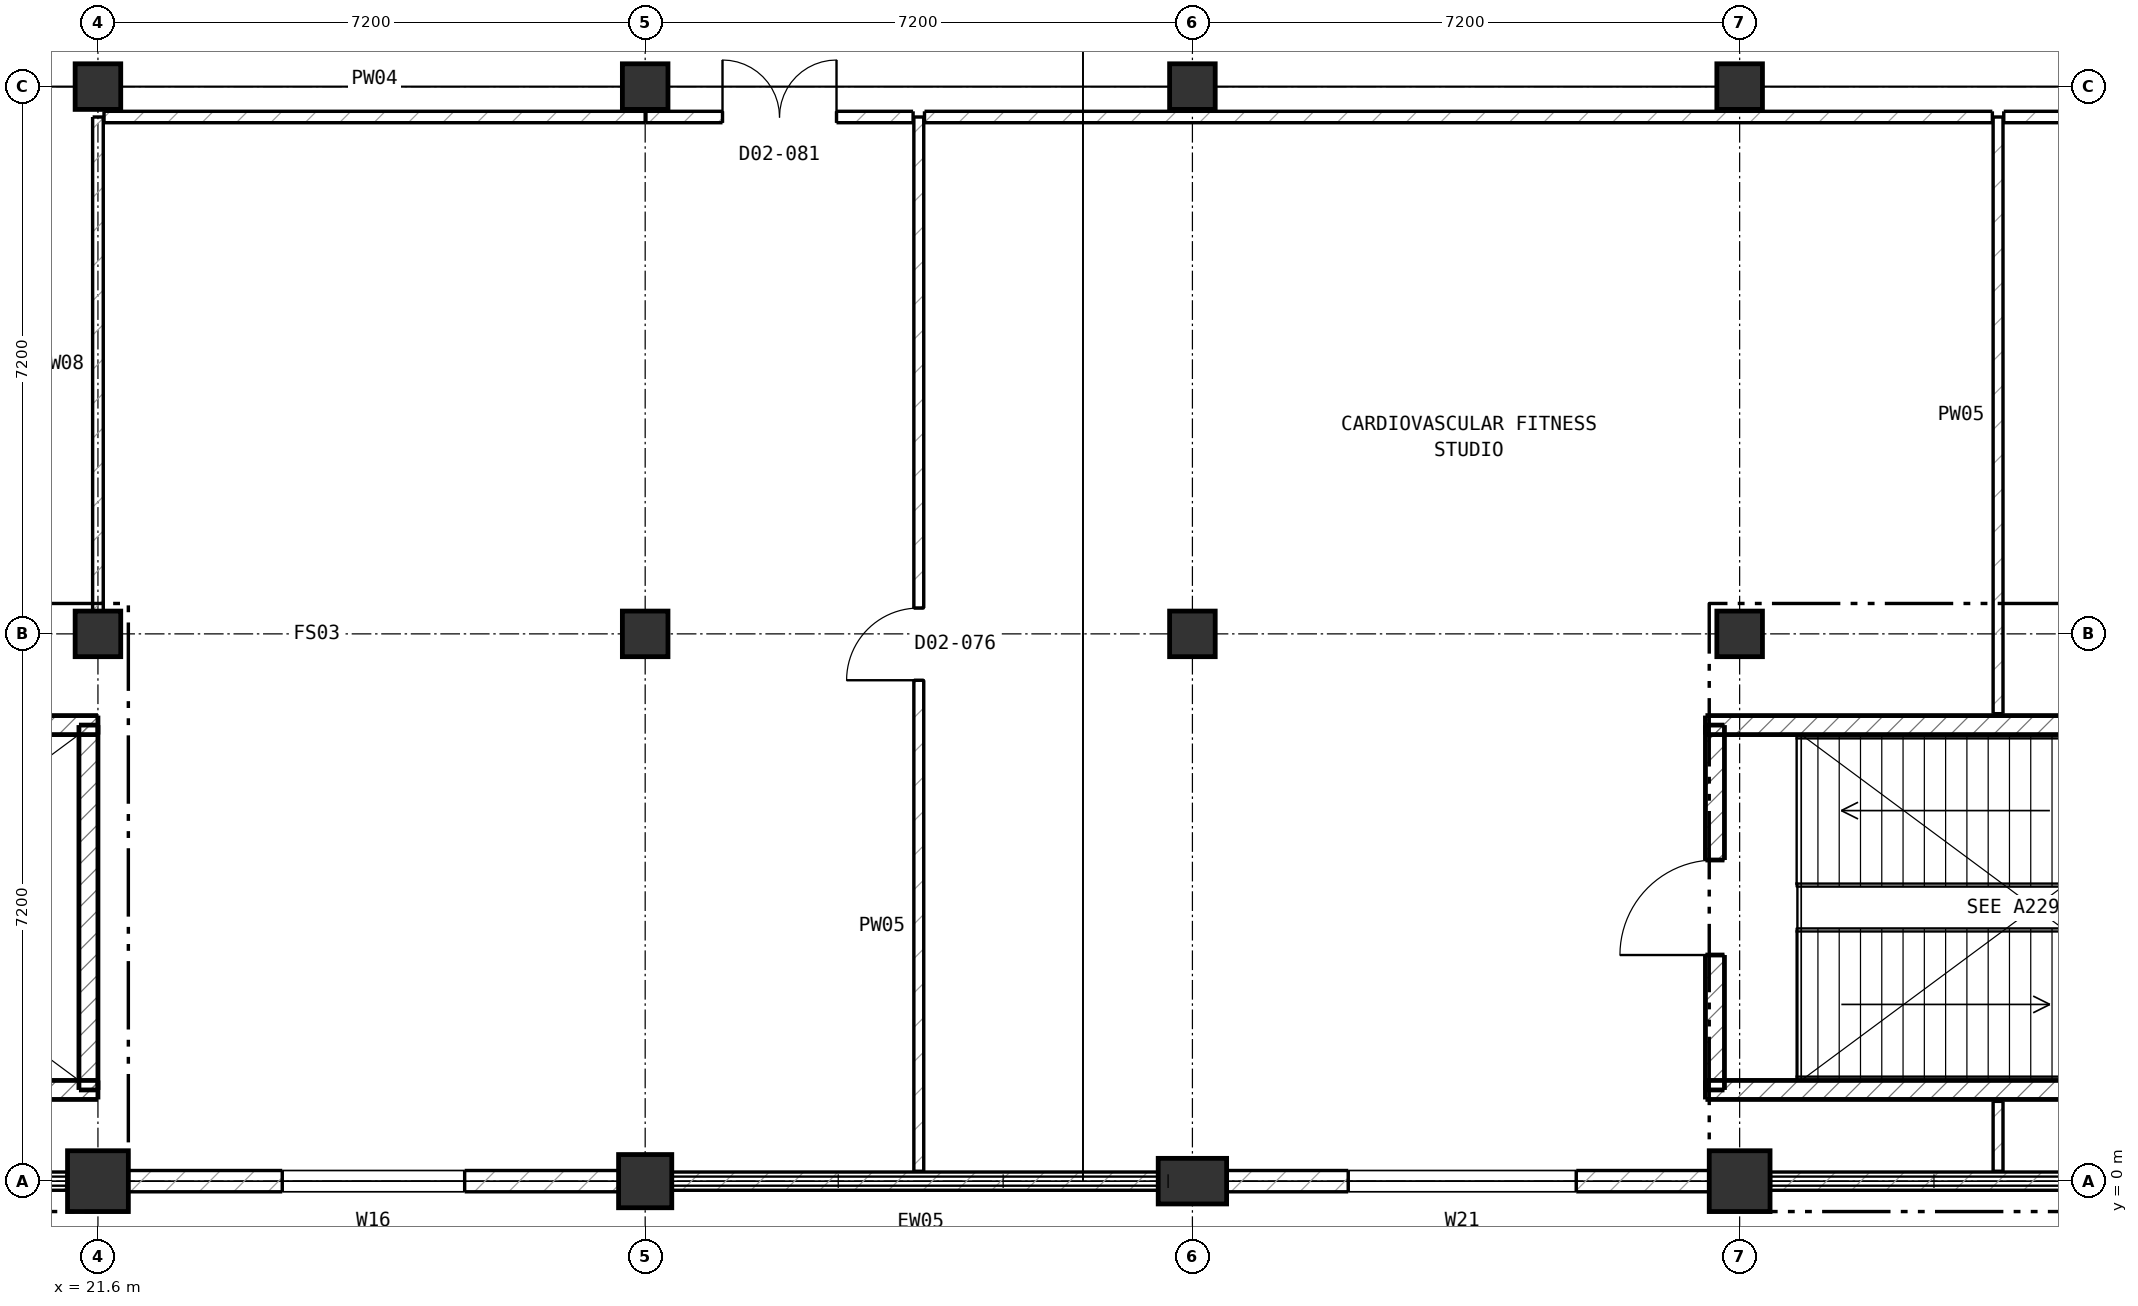
"""IFC4 building model, lengths in metres.
Left out: names, types, materials, properties, quantities, classifications, styles, units other than length and angle.
Written with IfcOpenShell. Run it as: python <this file> out.ifc"""

import sys

from ifc_helpers import new_model, si_unit, direction, frame, frame_2d, origin, origin_2d, place, context, subcontext, project, spatial, rectangle, extrude, element, fill, save


model = new_model("IFC4")
c1 = context("Model", 3, precision=1e-05, world=origin(), true_north=direction((0.0, 1.0)))
c2 = subcontext(c1, "Body", "Model", "MODEL_VIEW")
j1 = project(units=[si_unit("LENGTHUNIT", "METRE"), si_unit("PLANEANGLEUNIT", "RADIAN")], contexts=[c1])
p1 = place(None, origin())
s1 = spatial("IfcSite", under=j1, at=p1, CompositionType="ELEMENT")
p2 = place(p1, origin())
s2 = spatial("IfcBuilding", under=s1, at=p2, CompositionType="ELEMENT")
p3 = place(p2, frame((0.0, 0.0, 11.2)))
s3 = spatial("IfcBuildingStorey", under=s2, at=p3, CompositionType="ELEMENT", Elevation=11.2)
p4 = place(p3, frame((21.6, 0.0, 0.0), z_axis=(0.0, 0.0, 1.0), x_axis=(1.0, 0.0, 0.0)))
e1 = element("IfcColumn", 1, at=p4, inside=s3, PredefinedType="COLUMN", context=c2, shape_type="SweptSolid", body=[
    extrude(rectangle(XDim=0.8, YDim=0.8, at=origin_2d()), origin(), (0.0, 0.0, 1.0), 4.8),
])
for number, where, z_axis, x_axis in (
    (2, (21.6, 7.2, 0.0), (0.0, 0.0, 1.0), (1.0, 0.0, 0.0)),
    (3, (21.6, 14.4, 0.0), (0.0, 0.0, 1.0), (1.0, 0.0, 0.0)),
):
    element("IfcColumn", number, at=place(p3, frame(where, z_axis=z_axis, x_axis=x_axis)), inside=s3, PredefinedType="COLUMN", context=c2, shape_type="SweptSolid", body=[
        extrude(rectangle(XDim=0.6, YDim=0.6, at=origin_2d()), origin(), (0.0, 0.0, 1.0), 4.8),
    ])
p5 = place(p3, frame((28.8, 0.0, 0.0), z_axis=(0.0, 0.0, 1.0), x_axis=(1.0, 0.0, 0.0)))
e4 = element("IfcColumn", 4, at=p5, inside=s3, PredefinedType="COLUMN", context=c2, shape_type="SweptSolid", body=[
    extrude(rectangle(XDim=0.7, YDim=0.7, at=origin_2d()), origin(), (0.0, 0.0, 1.0), 4.8),
])
for number, where, z_axis, x_axis in (
    (5, (28.8, 7.2, 0.0), (0.0, 0.0, 1.0), (1.0, 0.0, 0.0)),
    (6, (28.8, 14.4, 0.0), (0.0, 0.0, 1.0), (1.0, 0.0, 0.0)),
):
    element("IfcColumn", number, at=place(p3, frame(where, z_axis=z_axis, x_axis=x_axis)), inside=s3, PredefinedType="COLUMN", context=c2, shape_type="SweptSolid", body=[
        extrude(rectangle(XDim=0.6, YDim=0.6, at=origin_2d()), origin(), (0.0, 0.0, 1.0), 4.8),
    ])
p6 = place(p3, frame((36.0, 0.0, 0.0), z_axis=(0.0, 0.0, 1.0), x_axis=(1.0, 0.0, 0.0)))
e7 = element("IfcColumn", 7, at=p6, inside=s3, PredefinedType="COLUMN", context=c2, shape_type="SweptSolid", body=[
    extrude(rectangle(XDim=0.6, YDim=0.9, at=origin_2d()), origin(), (0.0, 0.0, 1.0), 4.8),
])
for number, where, z_axis, x_axis in (
    (8, (36.0, 7.2, 0.0), (0.0, 0.0, 1.0), (1.0, 0.0, 0.0)),
    (9, (36.0, 14.4, 0.0), (0.0, 0.0, 1.0), (1.0, 0.0, 0.0)),
):
    element("IfcColumn", number, at=place(p3, frame(where, z_axis=z_axis, x_axis=x_axis)), inside=s3, PredefinedType="COLUMN", context=c2, shape_type="SweptSolid", body=[
        extrude(rectangle(XDim=0.6, YDim=0.6, at=origin_2d()), origin(), (0.0, 0.0, 1.0), 4.8),
    ])
p7 = place(p3, frame((43.2, 0.0, 0.0), z_axis=(0.0, 0.0, 1.0), x_axis=(1.0, 0.0, 0.0)))
e10 = element("IfcColumn", 10, at=p7, inside=s3, PredefinedType="COLUMN", context=c2, shape_type="SweptSolid", body=[
    extrude(rectangle(XDim=0.8, YDim=0.8, at=origin_2d()), origin(), (0.0, 0.0, 1.0), 4.8),
])
for number, where, z_axis, x_axis in (
    (11, (43.2, 7.2, 0.0), (0.0, 0.0, 1.0), (1.0, 0.0, 0.0)),
    (12, (43.2, 14.4, 0.0), (0.0, 0.0, 1.0), (1.0, 0.0, 0.0)),
):
    element("IfcColumn", number, at=place(p3, frame(where, z_axis=z_axis, x_axis=x_axis)), inside=s3, PredefinedType="COLUMN", context=c2, shape_type="SweptSolid", body=[
        extrude(rectangle(XDim=0.6, YDim=0.6, at=origin_2d()), origin(), (0.0, 0.0, 1.0), 4.8),
    ])
p8 = place(p3, frame((50.065, 0.0, 0.0), z_axis=(0.0, 0.0, 1.0), x_axis=(-1.0, 0.0, 0.0)))
e13 = element("IfcWall", 13, at=p8, inside=s3, PredefinedType="SOLIDWALL", context=c2, shape_type="SweptSolid", body=[
    extrude(rectangle(XDim=6.48, YDim=0.24, at=frame_2d((3.24, 0.0))), origin(), (0.0, 0.0, 1.0), 0.35),
])
p9 = place(p3, frame((42.815, 0.0, 0.0), z_axis=(0.0, 0.0, 1.0), x_axis=(-1.0, 0.0, 0.0)))
e14 = element("IfcWall", 14, at=p9, inside=s3, PredefinedType="SOLIDWALL", context=c2, shape_type="SweptSolid", body=[
    extrude(rectangle(XDim=6.53, YDim=0.28, at=frame_2d((3.265, 0.0))), origin(), (0.0, 0.0, 1.0), 4.185),
])
p10 = place(p9, frame((1.765, 0.0, 0.9)))
e15 = element("IfcOpeningElement", 15, at=p10, cuts=e14, PredefinedType="OPENING", context=c2, shape_type="SweptSolid", body=[
    extrude(rectangle(XDim=3.0, YDim=2.1, at=frame_2d((1.5, 1.05))), frame((0.0, 0.15, 0.0), z_axis=(0.0, -1.0, 0.0), x_axis=(1.0, 0.0, 0.0)), (0.0, 0.0, 1.0), 0.3),
])
p11 = place(p3, frame((35.715, 0.0, 0.0), z_axis=(0.0, 0.0, 1.0), x_axis=(-1.0, 0.0, 0.0)))
e16 = element("IfcWall", 16, at=p11, inside=s3, PredefinedType="SOLIDWALL", context=c2, shape_type="SweptSolid", body=[
    extrude(rectangle(XDim=6.58, YDim=0.24, at=frame_2d((3.29, 0.0))), origin(), (0.0, 0.0, 1.0), 0.35),
])
p12 = place(p3, frame((28.465, 0.0, 0.0), z_axis=(0.0, 0.0, 1.0), x_axis=(-1.0, 0.0, 0.0)))
e17 = element("IfcWall", 17, at=p12, inside=s3, PredefinedType="SOLIDWALL", context=c2, shape_type="SweptSolid", body=[
    extrude(rectangle(XDim=6.48, YDim=0.28, at=frame_2d((3.24, 0.0))), origin(), (0.0, 0.0, 1.0), 4.185),
])
p13 = place(p12, frame((2.04, 0.0, 0.9)))
e18 = element("IfcOpeningElement", 18, at=p13, cuts=e17, PredefinedType="OPENING", context=c2, shape_type="SweptSolid", body=[
    extrude(rectangle(XDim=2.4, YDim=2.1, at=frame_2d((1.2, 1.05))), frame((0.0, 0.15, 0.0), z_axis=(0.0, -1.0, 0.0), x_axis=(1.0, 0.0, 0.0)), (0.0, 0.0, 1.0), 0.3),
])
p14 = place(p3, frame((21.215, 0.0, 0.0), z_axis=(0.0, 0.0, 1.0), x_axis=(-1.0, 0.0, 0.0)))
e19 = element("IfcWall", 19, at=p14, inside=s3, PredefinedType="SOLIDWALL", context=c2, shape_type="SweptSolid", body=[
    extrude(rectangle(XDim=6.53, YDim=0.24, at=frame_2d((3.265, 0.0))), origin(), (0.0, 0.0, 1.0), 0.35),
])
p15 = place(p3, frame((13.95, 6.0, 0.0), z_axis=(0.0, 0.0, 1.0), x_axis=(1.0, 0.0, 0.0)))
e20 = element("IfcWall", 20, at=p15, inside=s3, PredefinedType="SHEAR", context=c2, shape_type="SweptSolid", body=[
    extrude(rectangle(XDim=7.65, YDim=0.25, at=frame_2d((3.825, 0.0))), origin(), (0.0, 0.0, 1.0), 4.8),
])
p16 = place(p3, frame((21.475, 6.0, 0.0), z_axis=(0.0, 0.0, 1.0), x_axis=(0.0, -1.0, 0.0)))
e21 = element("IfcWall", 21, at=p16, inside=s3, PredefinedType="SHEAR", context=c2, shape_type="SweptSolid", body=[
    extrude(rectangle(XDim=4.8, YDim=0.25, at=frame_2d((2.4, 0.0))), origin(), (0.0, 0.0, 1.0), 4.8),
])
p17 = place(p3, frame((21.6, 1.2, 0.0), z_axis=(0.0, 0.0, 1.0), x_axis=(-1.0, 0.0, 0.0)))
e22 = element("IfcWall", 22, at=p17, inside=s3, PredefinedType="SHEAR", context=c2, shape_type="SweptSolid", body=[
    extrude(rectangle(XDim=7.65, YDim=0.25, at=frame_2d((3.825, 0.0))), origin(), (0.0, 0.0, 1.0), 4.8),
])
p18 = place(p3, frame((42.875, 1.2, 0.0), z_axis=(0.0, 0.0, 1.0), x_axis=(0.0, 1.0, 0.0)))
e23 = element("IfcWall", 23, at=p18, inside=s3, PredefinedType="SHEAR", context=c2, shape_type="SweptSolid", body=[
    extrude(rectangle(XDim=4.8, YDim=0.25, at=frame_2d((2.4, 0.0))), origin(), (0.0, 0.0, 1.0), 4.8),
])
p19 = place(p18, frame((1.775, 0.0, 0.0)))
e24 = element("IfcOpeningElement", 24, at=p19, cuts=e23, PredefinedType="OPENING", context=c2, shape_type="SweptSolid", body=[
    extrude(rectangle(XDim=1.25, YDim=2.2, at=frame_2d((0.625, 1.1))), frame((0.0, 0.135, 0.0), z_axis=(0.0, -1.0, 0.0), x_axis=(1.0, 0.0, 0.0)), (0.0, 0.0, 1.0), 0.27),
])
for number, where, z_axis, x_axis in (
    (25, (42.75, 6.0, 0.0), (0.0, 0.0, 1.0), (1.0, 0.0, 0.0)),
    (26, (50.4, 1.2, 0.0), (0.0, 0.0, 1.0), (-1.0, 0.0, 0.0)),
):
    element("IfcWall", number, at=place(p3, frame(where, z_axis=z_axis, x_axis=x_axis)), inside=s3, PredefinedType="SHEAR", context=c2, shape_type="SweptSolid", body=[
        extrude(rectangle(XDim=7.65, YDim=0.25, at=frame_2d((3.825, 0.0))), origin(), (0.0, 0.0, 1.0), 4.8),
    ])
p20 = place(p3, frame((21.6, 7.5, 0.0), z_axis=(0.0, 0.0, 1.0), x_axis=(0.0, 1.0, 0.0)))
e27 = element("IfcWall", 27, at=p20, inside=s3, PredefinedType="PARTITIONING", context=c2, shape_type="SweptSolid", body=[
    extrude(rectangle(XDim=6.5, YDim=0.14, at=frame_2d((3.25, 0.0))), origin(), (0.0, 0.0, 1.0), 4.51),
])
p21 = place(p3, frame((46.6, 0.13, 0.0), z_axis=(0.0, 0.0, 1.0), x_axis=(0.0, 1.0, 0.0)))
e28 = element("IfcWall", 28, at=p21, inside=s3, PredefinedType="PARTITIONING", context=c2, shape_type="SweptSolid", body=[
    extrude(rectangle(XDim=0.92, YDim=0.13, at=frame_2d((0.46, 0.0))), origin(), (0.0, 0.0, 1.0), 4.51),
])
p22 = place(p3, frame((46.6, 6.15, 0.0), z_axis=(0.0, 0.0, 1.0), x_axis=(0.0, 1.0, 0.0)))
e29 = element("IfcWall", 29, at=p22, inside=s3, PredefinedType="PARTITIONING", context=c2, shape_type="SweptSolid", body=[
    extrude(rectangle(XDim=7.85, YDim=0.13, at=frame_2d((3.925, 0.0))), origin(), (0.0, 0.0, 1.0), 4.51),
])
p23 = place(p3, frame((32.4, 0.13, 0.0), z_axis=(0.0, 0.0, 1.0), x_axis=(0.0, 1.0, 0.0)))
e30 = element("IfcWall", 30, at=p23, inside=s3, PredefinedType="PARTITIONING", context=c2, shape_type="SweptSolid", body=[
    extrude(rectangle(XDim=13.87, YDim=0.13, at=frame_2d((6.935, 0.0))), origin(), (0.0, 0.0, 1.0), 4.51),
])
p24 = place(p23, frame((6.46, 0.0, 0.0)))
e31 = element("IfcOpeningElement", 31, at=p24, cuts=e30, PredefinedType="OPENING", context=c2, shape_type="SweptSolid", body=[
    extrude(rectangle(XDim=0.95, YDim=2.1, at=frame_2d((0.475, 1.05))), frame((0.0, 0.075, 0.0), z_axis=(0.0, -1.0, 0.0), x_axis=(1.0, 0.0, 0.0)), (0.0, 0.0, 1.0), 0.15),
])
p25 = place(p3, frame((21.68, 14.0, 0.0), z_axis=(0.0, 0.0, 1.0), x_axis=(1.0, 0.0, 0.0)))
e32 = element("IfcWall", 32, at=p25, inside=s3, PredefinedType="PARTITIONING", context=c2, shape_type="SweptSolid", body=[
    extrude(rectangle(XDim=7.12, YDim=0.15, at=frame_2d((3.56, 0.0))), origin(), (0.0, 0.0, 1.0), 4.51),
])
p26 = place(p3, frame((28.81, 14.0, 0.0), z_axis=(0.0, 0.0, 1.0), x_axis=(1.0, 0.0, 0.0)))
e33 = element("IfcWall", 33, at=p26, inside=s3, PredefinedType="PARTITIONING", context=c2, shape_type="SweptSolid", body=[
    extrude(rectangle(XDim=3.515, YDim=0.15, at=frame_2d((1.757, 0.0))), origin(), (0.0, 0.0, 1.0), 4.51),
])
p27 = place(p26, frame((1.008, 0.0, 0.0)))
e34 = element("IfcOpeningElement", 34, at=p27, cuts=e33, PredefinedType="OPENING", context=c2, shape_type="SweptSolid", body=[
    extrude(rectangle(XDim=1.5, YDim=2.2, at=frame_2d((0.75, 1.1))), frame((0.0, 0.085, 0.0), z_axis=(0.0, -1.0, 0.0), x_axis=(1.0, 0.0, 0.0)), (0.0, 0.0, 1.0), 0.17),
])
p28 = place(p3, frame((32.475, 14.0, 0.0), z_axis=(0.0, 0.0, 1.0), x_axis=(1.0, 0.0, 0.0)))
e35 = element("IfcWall", 35, at=p28, inside=s3, PredefinedType="PARTITIONING", context=c2, shape_type="SweptSolid", body=[
    extrude(rectangle(XDim=14.05, YDim=0.15, at=frame_2d((7.025, 0.0))), origin(), (0.0, 0.0, 1.0), 4.51),
])
p29 = place(p3, frame((46.675, 14.0, 0.0), z_axis=(0.0, 0.0, 1.0), x_axis=(1.0, 0.0, 0.0)))
e36 = element("IfcWall", 36, at=p29, inside=s3, PredefinedType="PARTITIONING", context=c2, shape_type="SweptSolid", body=[
    extrude(rectangle(XDim=3.725, YDim=0.15, at=frame_2d((1.862, 0.0))), origin(), (0.0, 0.0, 1.0), 4.51),
])
p30 = place(p10, origin())
e37 = element("IfcWindow", 37, at=p30, inside=s3, PartitioningType="SINGLE_PANEL", PredefinedType="WINDOW", context=c2, shape_type="SweptSolid", body=[
    extrude(rectangle(XDim=3.0, YDim=2.1, at=frame_2d((1.5, 1.05))), frame((0.0, 0.03, 0.0), z_axis=(0.0, -1.0, 0.0), x_axis=(1.0, 0.0, 0.0)), (0.0, 0.0, 1.0), 0.06),
])
fill(e15, e37)
p31 = place(p13, origin())
e38 = element("IfcWindow", 38, at=p31, inside=s3, PartitioningType="SINGLE_PANEL", PredefinedType="WINDOW", context=c2, shape_type="SweptSolid", body=[
    extrude(rectangle(XDim=2.4, YDim=2.1, at=frame_2d((1.2, 1.05))), frame((0.0, 0.03, 0.0), z_axis=(0.0, -1.0, 0.0), x_axis=(1.0, 0.0, 0.0)), (0.0, 0.0, 1.0), 0.06),
])
fill(e18, e38)
p32 = place(p19, origin())
e39 = element("IfcDoor", 39, at=p32, inside=s3, OperationType="SINGLE_SWING_LEFT", PredefinedType="DOOR", context=c2, shape_type="SweptSolid", body=[
    extrude(rectangle(XDim=1.25, YDim=2.2, at=frame_2d((0.625, 1.1))), frame((0.0, 0.025, 0.0), z_axis=(0.0, -1.0, 0.0), x_axis=(1.0, 0.0, 0.0)), (0.0, 0.0, 1.0), 0.05),
])
fill(e24, e39)
p33 = place(p24, origin())
e40 = element("IfcDoor", 40, at=p33, inside=s3, OperationType="SINGLE_SWING_LEFT", PredefinedType="DOOR", context=c2, shape_type="SweptSolid", body=[
    extrude(rectangle(XDim=0.95, YDim=2.1, at=frame_2d((0.475, 1.05))), frame((0.0, 0.025, 0.0), z_axis=(0.0, -1.0, 0.0), x_axis=(1.0, 0.0, 0.0)), (0.0, 0.0, 1.0), 0.05),
])
fill(e31, e40)
p34 = place(p27, origin())
e41 = element("IfcDoor", 41, at=p34, inside=s3, OperationType="DOUBLE_DOOR_SINGLE_SWING", PredefinedType="DOOR", context=c2, shape_type="SweptSolid", body=[
    extrude(rectangle(XDim=1.5, YDim=2.2, at=frame_2d((0.75, 1.1))), frame((0.0, 0.025, 0.0), z_axis=(0.0, -1.0, 0.0), x_axis=(1.0, 0.0, 0.0)), (0.0, 0.0, 1.0), 0.05),
])
fill(e34, e41)
save(model, sys.argv[1])
